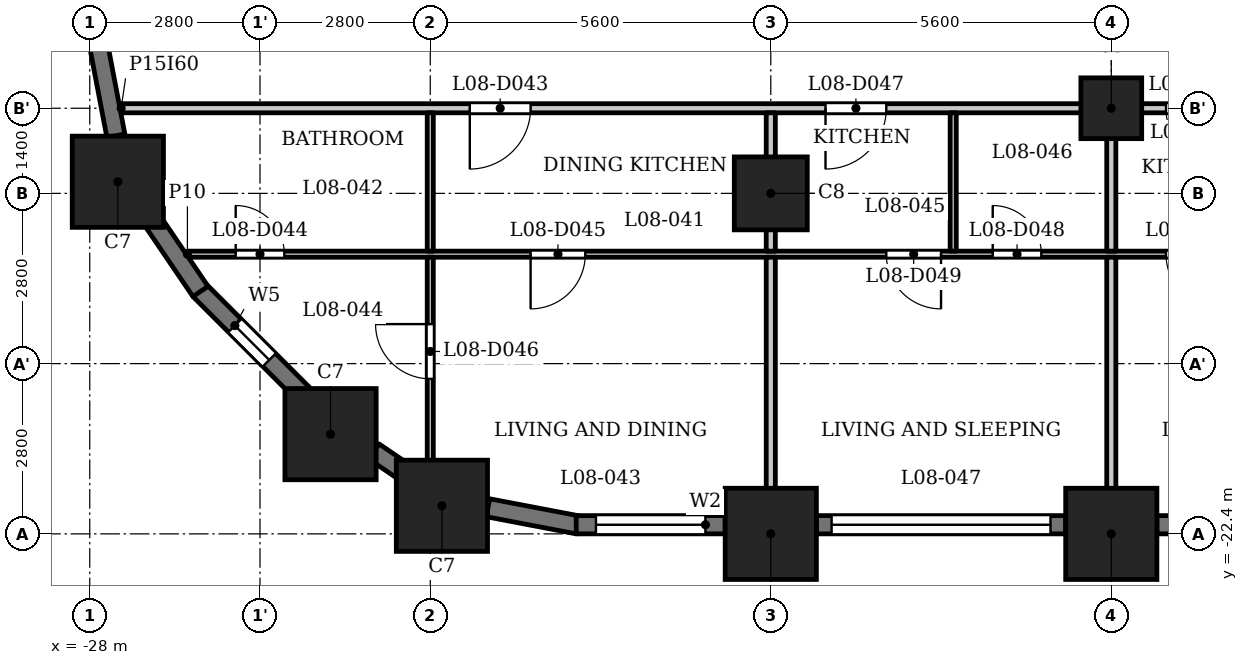
"""IFC4 building model, lengths in metres.
Left out: names, types, materials, properties, quantities, classifications, styles, units other than length and angle.
Written with IfcOpenShell. Run it as: python <this file> out.ifc"""

import sys

from ifc_helpers import new_model, si_unit, direction, frame, frame_2d, origin, origin_2d, place, context, subcontext, project, spatial, rectangle, extrude, element, fill, save


model = new_model("IFC4")
c1 = context("Model", 3, precision=1e-05, world=origin(), true_north=direction((0.0, 1.0)))
c2 = subcontext(c1, "Body", "Model", "MODEL_VIEW")
j1 = project(units=[si_unit("LENGTHUNIT", "METRE"), si_unit("PLANEANGLEUNIT", "RADIAN")], contexts=[c1])
p1 = place(None, origin())
s1 = spatial("IfcSite", under=j1, at=p1, CompositionType="ELEMENT")
p2 = place(p1, origin())
s2 = spatial("IfcBuilding", under=s1, at=p2, CompositionType="ELEMENT")
p3 = place(p2, frame((0.0, 0.0, 37.5)))
s3 = spatial("IfcBuildingStorey", under=s2, at=p3, CompositionType="ELEMENT", Elevation=37.5)
for number, where, z_axis, x_axis in (
    (1, (-22.209, -21.938, 0.0), (0.0, 0.0, 1.0), (1.0, 0.0, 0.0)),
    (2, (-16.8, -22.4, 0.0), (0.0, 0.0, 1.0), (1.0, 0.0, 0.0)),
    (3, (-11.2, -22.4, 0.0), (0.0, 0.0, 1.0), (1.0, 0.0, 0.0)),
    (4, (-27.538, -16.609, 0.0), (0.0, 0.0, 1.0), (1.0, 0.0, 0.0)),
    (5, (-24.04, -20.76, 0.0), (0.0, 0.0, 1.0), (1.0, 0.0, 0.0)),
):
    element("IfcColumn", number, at=place(p3, frame(where, z_axis=z_axis, x_axis=x_axis)), inside=s3, PredefinedType="COLUMN", context=c2, shape_type="SweptSolid", body=[
        extrude(rectangle(XDim=1.5, YDim=1.5, at=origin_2d()), origin(), (0.0, 0.0, 1.0), 3.5),
    ])
p4 = place(p3, frame((-16.8, -16.8, 0.0), z_axis=(0.0, 0.0, 1.0), x_axis=(1.0, 0.0, 0.0)))
e6 = element("IfcColumn", 6, at=p4, inside=s3, PredefinedType="COLUMN", context=c2, shape_type="SweptSolid", body=[
    extrude(rectangle(XDim=1.2, YDim=1.2, at=origin_2d()), origin(), (0.0, 0.0, 1.0), 3.5),
])
p5 = place(p3, frame((-11.2, -15.4, 0.0), z_axis=(0.0, 0.0, 1.0), x_axis=(1.0, 0.0, 0.0)))
e7 = element("IfcColumn", 7, at=p5, inside=s3, PredefinedType="COLUMN", context=c2, shape_type="SweptSolid", body=[
    extrude(rectangle(XDim=1.0, YDim=1.0, at=origin_2d()), origin(), (0.0, 0.0, 1.0), 3.5),
])
p6 = place(p3, frame((-26.197, -18.391, 0.0), z_axis=(0.0, 0.0, 1.0), x_axis=(0.707106781187, -0.707106781187, 0.0)))
e8 = element("IfcWall", 8, at=p6, inside=s3, PredefinedType="SOLIDWALL", context=c2, shape_type="SweptSolid", body=[
    extrude(rectangle(XDim=2.45, YDim=0.3, at=frame_2d((1.225, 0.0))), origin(), (0.0, 0.0, 1.0), 2.35),
])
p7 = place(p6, frame((0.825, 0.0, 0.6)))
e9 = element("IfcOpeningElement", 9, at=p7, cuts=e8, PredefinedType="OPENING", context=c2, shape_type="SweptSolid", body=[
    extrude(rectangle(XDim=0.8, YDim=1.55, at=frame_2d((0.4, 0.775))), frame((0.0, 0.16, 0.0), z_axis=(0.0, -1.0, 0.0), x_axis=(1.0, 0.0, 0.0)), (0.0, 0.0, 1.0), 0.32),
])
p8 = place(p3, frame((-23.327, -21.045, 0.0), z_axis=(0.0, 0.0, 1.0), x_axis=(0.827080706709, -0.562083182981, 0.0)))
e10 = element("IfcWall", 10, at=p8, inside=s3, PredefinedType="SOLIDWALL", context=c2, shape_type="SweptSolid", body=[
    extrude(rectangle(XDim=0.677, YDim=0.3, at=frame_2d((0.339, 0.0))), origin(), (0.0, 0.0, 1.0), 3.2),
])
p9 = place(p3, frame((-21.451, -21.97, 0.0), z_axis=(0.0, 0.0, 1.0), x_axis=(0.982287454367, -0.187380247071, 0.0)))
e11 = element("IfcWall", 11, at=p9, inside=s3, PredefinedType="SOLIDWALL", context=c2, shape_type="SweptSolid", body=[
    extrude(rectangle(XDim=1.506, YDim=0.3, at=frame_2d((0.753, 0.0))), origin(), (0.0, 0.0, 1.0), 2.35),
])
p10 = place(p3, frame((-20.0, -22.25, 0.0), z_axis=(0.0, 0.0, 1.0), x_axis=(1.0, 0.0, 0.0)))
e12 = element("IfcWall", 12, at=p10, inside=s3, PredefinedType="SOLIDWALL", context=c2, shape_type="SweptSolid", body=[
    extrude(rectangle(XDim=2.45, YDim=0.3, at=frame_2d((1.225, 0.0))), origin(), (0.0, 0.0, 1.0), 2.35),
])
p11 = place(p10, frame((0.325, 0.0, 0.9)))
e13 = element("IfcOpeningElement", 13, at=p11, cuts=e12, PredefinedType="OPENING", context=c2, shape_type="SweptSolid", body=[
    extrude(rectangle(XDim=1.8, YDim=1.25, at=frame_2d((0.9, 0.625))), frame((0.0, 0.16, 0.0), z_axis=(0.0, -1.0, 0.0), x_axis=(1.0, 0.0, 0.0)), (0.0, 0.0, 1.0), 0.32),
])
p12 = place(p3, frame((-16.05, -22.25, 0.0), z_axis=(0.0, 0.0, 1.0), x_axis=(1.0, 0.0, 0.0)))
e14 = element("IfcWall", 14, at=p12, inside=s3, PredefinedType="SOLIDWALL", context=c2, shape_type="SweptSolid", body=[
    extrude(rectangle(XDim=4.1, YDim=0.3, at=frame_2d((2.05, 0.0))), origin(), (0.0, 0.0, 1.0), 2.35),
])
p13 = place(p12, frame((0.25, 0.0, 1.2)))
e15 = element("IfcOpeningElement", 15, at=p13, cuts=e14, PredefinedType="OPENING", context=c2, shape_type="SweptSolid", body=[
    extrude(rectangle(XDim=3.6, YDim=0.95, at=frame_2d((1.8, 0.475))), frame((0.0, 0.16, 0.0), z_axis=(0.0, -1.0, 0.0), x_axis=(1.0, 0.0, 0.0)), (0.0, 0.0, 1.0), 0.32),
])
p14 = place(p3, frame((-10.45, -22.25, 0.0), z_axis=(0.0, 0.0, 1.0), x_axis=(1.0, 0.0, 0.0)))
e16 = element("IfcWall", 16, at=p14, inside=s3, PredefinedType="SOLIDWALL", context=c2, shape_type="SweptSolid", body=[
    extrude(rectangle(XDim=4.1, YDim=0.3, at=frame_2d((2.05, 0.0))), origin(), (0.0, 0.0, 1.0), 2.35),
])
p15 = place(p14, frame((0.25, 0.0, 1.2)))
e17 = element("IfcOpeningElement", 17, at=p15, cuts=e16, PredefinedType="OPENING", context=c2, shape_type="SweptSolid", body=[
    extrude(rectangle(XDim=3.6, YDim=0.95, at=frame_2d((1.8, 0.475))), frame((0.0, 0.16, 0.0), z_axis=(0.0, -1.0, 0.0), x_axis=(1.0, 0.0, 0.0)), (0.0, 0.0, 1.0), 0.32),
])
for number, where, z_axis, x_axis in (
    (18, (-27.853, -14.372, 0.0), (0.0, 0.0, 1.0), (0.187, -0.982, 0.0)),
    (19, (-27.025, -17.167, 0.0), (0.0, 0.0, 1.0), (0.562, -0.827, 0.0)),
):
    element("IfcWall", number, at=place(p3, frame(where, z_axis=z_axis, x_axis=x_axis)), inside=s3, PredefinedType="SOLIDWALL", context=c2, shape_type="SweptSolid", body=[
        extrude(rectangle(XDim=1.506, YDim=0.3, at=frame_2d((0.753, 0.0))), origin(), (0.0, 0.0, 1.0), 2.35),
    ])
p16 = place(p3, frame((-26.394, -17.8, 0.0), z_axis=(0.0, 0.0, 1.0), x_axis=(1.0, 0.0, 0.0)))
e20 = element("IfcWall", 20, at=p16, inside=s3, PredefinedType="PARTITIONING", context=c2, shape_type="SweptSolid", body=[
    extrude(rectangle(XDim=53.126, YDim=0.1, at=frame_2d((26.563, 0.0))), origin(), (0.0, 0.0, 1.0), 3.2),
])
p17 = place(p16, frame((0.794, 0.0, 0.0)))
e21 = element("IfcOpeningElement", 21, at=p17, cuts=e20, PredefinedType="OPENING", context=c2, shape_type="SweptSolid", body=[
    extrude(rectangle(XDim=0.8, YDim=2.1, at=frame_2d((0.4, 1.05))), frame((0.0, 0.06, 0.0), z_axis=(0.0, -1.0, 0.0), x_axis=(1.0, 0.0, 0.0)), (0.0, 0.0, 1.0), 0.12),
])
p18 = place(p16, frame((5.644, 0.0, 0.0)))
e22 = element("IfcOpeningElement", 22, at=p18, cuts=e20, PredefinedType="OPENING", context=c2, shape_type="SweptSolid", body=[
    extrude(rectangle(XDim=0.9, YDim=2.1, at=frame_2d((0.45, 1.05))), frame((0.0, 0.06, 0.0), z_axis=(0.0, -1.0, 0.0), x_axis=(1.0, 0.0, 0.0)), (0.0, 0.0, 1.0), 0.12),
])
p19 = place(p16, frame((13.244, 0.0, 0.0)))
e23 = element("IfcOpeningElement", 23, at=p19, cuts=e20, PredefinedType="OPENING", context=c2, shape_type="SweptSolid", body=[
    extrude(rectangle(XDim=0.8, YDim=2.1, at=frame_2d((0.4, 1.05))), frame((0.0, 0.06, 0.0), z_axis=(0.0, -1.0, 0.0), x_axis=(1.0, 0.0, 0.0)), (0.0, 0.0, 1.0), 0.12),
])
p20 = place(p16, frame((11.494, 0.0, 0.0)))
e24 = element("IfcOpeningElement", 24, at=p20, cuts=e20, PredefinedType="OPENING", context=c2, shape_type="SweptSolid", body=[
    extrude(rectangle(XDim=0.9, YDim=2.1, at=frame_2d((0.45, 1.05))), frame((0.0, 0.06, 0.0), z_axis=(0.0, -1.0, 0.0), x_axis=(1.0, 0.0, 0.0)), (0.0, 0.0, 1.0), 0.12),
])
p21 = place(p16, frame((19.344, 0.0, 0.0)))
e25 = element("IfcOpeningElement", 25, at=p21, cuts=e20, PredefinedType="OPENING", context=c2, shape_type="SweptSolid", body=[
    extrude(rectangle(XDim=0.8, YDim=2.1, at=frame_2d((0.4, 1.05))), frame((0.0, 0.06, 0.0), z_axis=(0.0, -1.0, 0.0), x_axis=(1.0, 0.0, 0.0)), (0.0, 0.0, 1.0), 0.12),
])
p22 = place(p16, frame((16.094, 0.0, 0.0)))
e26 = element("IfcOpeningElement", 26, at=p22, cuts=e20, PredefinedType="OPENING", context=c2, shape_type="SweptSolid", body=[
    extrude(rectangle(XDim=0.9, YDim=2.1, at=frame_2d((0.45, 1.05))), frame((0.0, 0.06, 0.0), z_axis=(0.0, -1.0, 0.0), x_axis=(1.0, 0.0, 0.0)), (0.0, 0.0, 1.0), 0.12),
])
p23 = place(p16, frame((24.944, 0.0, 0.0)))
e27 = element("IfcOpeningElement", 27, at=p23, cuts=e20, PredefinedType="OPENING", context=c2, shape_type="SweptSolid", body=[
    extrude(rectangle(XDim=0.8, YDim=2.1, at=frame_2d((0.4, 1.05))), frame((0.0, 0.06, 0.0), z_axis=(0.0, -1.0, 0.0), x_axis=(1.0, 0.0, 0.0)), (0.0, 0.0, 1.0), 0.12),
])
p24 = place(p16, frame((22.444, 0.0, 0.0)))
e28 = element("IfcOpeningElement", 28, at=p24, cuts=e20, PredefinedType="OPENING", context=c2, shape_type="SweptSolid", body=[
    extrude(rectangle(XDim=0.9, YDim=2.1, at=frame_2d((0.45, 1.05))), frame((0.0, 0.06, 0.0), z_axis=(0.0, -1.0, 0.0), x_axis=(1.0, 0.0, 0.0)), (0.0, 0.0, 1.0), 0.12),
])
p25 = place(p16, frame((30.294, 0.0, 0.0)))
e29 = element("IfcOpeningElement", 29, at=p25, cuts=e20, PredefinedType="OPENING", context=c2, shape_type="SweptSolid", body=[
    extrude(rectangle(XDim=0.8, YDim=2.1, at=frame_2d((0.4, 1.05))), frame((0.0, 0.06, 0.0), z_axis=(0.0, -1.0, 0.0), x_axis=(1.0, 0.0, 0.0)), (0.0, 0.0, 1.0), 0.12),
])
p26 = place(p16, frame((26.794, 0.0, 0.0)))
e30 = element("IfcOpeningElement", 30, at=p26, cuts=e20, PredefinedType="OPENING", context=c2, shape_type="SweptSolid", body=[
    extrude(rectangle(XDim=0.9, YDim=2.1, at=frame_2d((0.45, 1.05))), frame((0.0, 0.06, 0.0), z_axis=(0.0, -1.0, 0.0), x_axis=(1.0, 0.0, 0.0)), (0.0, 0.0, 1.0), 0.12),
])
p27 = place(p16, frame((32.744, 0.0, 0.0)))
e31 = element("IfcOpeningElement", 31, at=p27, cuts=e20, PredefinedType="OPENING", context=c2, shape_type="SweptSolid", body=[
    extrude(rectangle(XDim=0.8, YDim=2.1, at=frame_2d((0.4, 1.05))), frame((0.0, 0.06, 0.0), z_axis=(0.0, -1.0, 0.0), x_axis=(1.0, 0.0, 0.0)), (0.0, 0.0, 1.0), 0.12),
])
p28 = place(p16, frame((35.594, 0.0, 0.0)))
e32 = element("IfcOpeningElement", 32, at=p28, cuts=e20, PredefinedType="OPENING", context=c2, shape_type="SweptSolid", body=[
    extrude(rectangle(XDim=0.9, YDim=2.1, at=frame_2d((0.45, 1.05))), frame((0.0, 0.06, 0.0), z_axis=(0.0, -1.0, 0.0), x_axis=(1.0, 0.0, 0.0)), (0.0, 0.0, 1.0), 0.12),
])
p29 = place(p16, frame((39.244, 0.0, 0.0)))
e33 = element("IfcOpeningElement", 33, at=p29, cuts=e20, PredefinedType="OPENING", context=c2, shape_type="SweptSolid", body=[
    extrude(rectangle(XDim=0.9, YDim=2.1, at=frame_2d((0.45, 1.05))), frame((0.0, 0.06, 0.0), z_axis=(0.0, -1.0, 0.0), x_axis=(1.0, 0.0, 0.0)), (0.0, 0.0, 1.0), 0.12),
])
p30 = place(p16, frame((41.544, 0.0, 0.0)))
e34 = element("IfcOpeningElement", 34, at=p30, cuts=e20, PredefinedType="OPENING", context=c2, shape_type="SweptSolid", body=[
    extrude(rectangle(XDim=0.9, YDim=2.1, at=frame_2d((0.45, 1.05))), frame((0.0, 0.06, 0.0), z_axis=(0.0, -1.0, 0.0), x_axis=(1.0, 0.0, 0.0)), (0.0, 0.0, 1.0), 0.12),
])
p31 = place(p16, frame((49.362, 0.0, 0.0)))
e35 = element("IfcOpeningElement", 35, at=p31, cuts=e20, PredefinedType="OPENING", context=c2, shape_type="SweptSolid", body=[
    extrude(rectangle(XDim=0.8, YDim=2.1, at=frame_2d((0.4, 1.05))), frame((0.0, 0.06, 0.0), z_axis=(0.0, -1.0, 0.0), x_axis=(1.0, 0.0, 0.0)), (0.0, 0.0, 1.0), 0.12),
])
p32 = place(p16, frame((45.094, 0.0, 0.0)))
e36 = element("IfcOpeningElement", 36, at=p32, cuts=e20, PredefinedType="OPENING", context=c2, shape_type="SweptSolid", body=[
    extrude(rectangle(XDim=0.9, YDim=2.1, at=frame_2d((0.45, 1.05))), frame((0.0, 0.06, 0.0), z_axis=(0.0, -1.0, 0.0), x_axis=(1.0, 0.0, 0.0)), (0.0, 0.0, 1.0), 0.12),
])
p33 = place(p3, frame((-27.484, -15.4, 0.0), z_axis=(0.0, 0.0, 1.0), x_axis=(1.0, 0.0, 0.0)))
e37 = element("IfcWall", 37, at=p33, inside=s3, PredefinedType="PARTITIONING", context=c2, shape_type="SweptSolid", body=[
    extrude(rectangle(XDim=54.968, YDim=0.15, at=frame_2d((27.484, 0.0))), origin(), (0.0, 0.0, 1.0), 3.2),
])
p34 = place(p33, frame((5.734, 0.0, 0.0)))
e38 = element("IfcOpeningElement", 38, at=p34, cuts=e37, PredefinedType="OPENING", context=c2, shape_type="SweptSolid", body=[
    extrude(rectangle(XDim=1.0, YDim=2.1, at=frame_2d((0.5, 1.05))), frame((0.0, 0.085, 0.0), z_axis=(0.0, -1.0, 0.0), x_axis=(1.0, 0.0, 0.0)), (0.0, 0.0, 1.0), 0.17),
])
p35 = place(p33, frame((11.584, 0.0, 0.0)))
e39 = element("IfcOpeningElement", 39, at=p35, cuts=e37, PredefinedType="OPENING", context=c2, shape_type="SweptSolid", body=[
    extrude(rectangle(XDim=1.0, YDim=2.1, at=frame_2d((0.5, 1.05))), frame((0.0, 0.085, 0.0), z_axis=(0.0, -1.0, 0.0), x_axis=(1.0, 0.0, 0.0)), (0.0, 0.0, 1.0), 0.17),
])
p36 = place(p33, frame((17.184, 0.0, 0.0)))
e40 = element("IfcOpeningElement", 40, at=p36, cuts=e37, PredefinedType="OPENING", context=c2, shape_type="SweptSolid", body=[
    extrude(rectangle(XDim=1.0, YDim=2.1, at=frame_2d((0.5, 1.05))), frame((0.0, 0.085, 0.0), z_axis=(0.0, -1.0, 0.0), x_axis=(1.0, 0.0, 0.0)), (0.0, 0.0, 1.0), 0.17),
])
p37 = place(p33, frame((22.534, 0.0, 0.0)))
e41 = element("IfcOpeningElement", 41, at=p37, cuts=e37, PredefinedType="OPENING", context=c2, shape_type="SweptSolid", body=[
    extrude(rectangle(XDim=1.0, YDim=2.1, at=frame_2d((0.5, 1.05))), frame((0.0, 0.085, 0.0), z_axis=(0.0, -1.0, 0.0), x_axis=(1.0, 0.0, 0.0)), (0.0, 0.0, 1.0), 0.17),
])
p38 = place(p33, frame((28.884, 0.0, 0.0)))
e42 = element("IfcOpeningElement", 42, at=p38, cuts=e37, PredefinedType="OPENING", context=c2, shape_type="SweptSolid", body=[
    extrude(rectangle(XDim=1.0, YDim=2.1, at=frame_2d((0.5, 1.05))), frame((0.0, 0.085, 0.0), z_axis=(0.0, -1.0, 0.0), x_axis=(1.0, 0.0, 0.0)), (0.0, 0.0, 1.0), 0.17),
])
p39 = place(p33, frame((39.334, 0.0, 0.0)))
e43 = element("IfcOpeningElement", 43, at=p39, cuts=e37, PredefinedType="OPENING", context=c2, shape_type="SweptSolid", body=[
    extrude(rectangle(XDim=1.0, YDim=2.1, at=frame_2d((0.5, 1.05))), frame((0.0, 0.085, 0.0), z_axis=(0.0, -1.0, 0.0), x_axis=(1.0, 0.0, 0.0)), (0.0, 0.0, 1.0), 0.17),
])
p40 = place(p33, frame((45.184, 0.0, 0.0)))
e44 = element("IfcOpeningElement", 44, at=p40, cuts=e37, PredefinedType="OPENING", context=c2, shape_type="SweptSolid", body=[
    extrude(rectangle(XDim=1.0, YDim=2.1, at=frame_2d((0.5, 1.05))), frame((0.0, 0.085, 0.0), z_axis=(0.0, -1.0, 0.0), x_axis=(1.0, 0.0, 0.0)), (0.0, 0.0, 1.0), 0.17),
])
p41 = place(p3, frame((-22.4, -21.72, 0.0), z_axis=(0.0, 0.0, 1.0), x_axis=(0.0, 1.0, 0.0)))
e45 = element("IfcWall", 45, at=p41, inside=s3, PredefinedType="PARTITIONING", context=c2, shape_type="SweptSolid", body=[
    extrude(rectangle(XDim=3.87, YDim=0.1, at=frame_2d((1.935, 0.0))), origin(), (0.0, 0.0, 1.0), 3.2),
])
p42 = place(p41, frame((1.87, 0.0, 0.0)))
e46 = element("IfcOpeningElement", 46, at=p42, cuts=e45, PredefinedType="OPENING", context=c2, shape_type="SweptSolid", body=[
    extrude(rectangle(XDim=0.9, YDim=2.1, at=frame_2d((0.45, 1.05))), frame((0.0, 0.06, 0.0), z_axis=(0.0, -1.0, 0.0), x_axis=(1.0, 0.0, 0.0)), (0.0, 0.0, 1.0), 0.12),
])
p43 = place(p3, frame((-22.4, -17.75, 0.0), z_axis=(0.0, 0.0, 1.0), x_axis=(0.0, 1.0, 0.0)))
e47 = element("IfcWall", 47, at=p43, inside=s3, PredefinedType="PARTITIONING", context=c2, shape_type="SweptSolid", body=[
    extrude(rectangle(XDim=2.275, YDim=0.1, at=frame_2d((1.137, 0.0))), origin(), (0.0, 0.0, 1.0), 3.2),
])
p44 = place(p3, frame((-16.8, -23.13, 0.0), z_axis=(0.0, 0.0, 1.0), x_axis=(0.0, 1.0, 0.0)))
e48 = element("IfcWall", 48, at=p44, inside=s3, PredefinedType="PARTITIONING", context=c2, shape_type="SweptSolid", body=[
    extrude(rectangle(XDim=5.28, YDim=0.15, at=frame_2d((2.64, 0.0))), origin(), (0.0, 0.0, 1.0), 3.2),
])
p45 = place(p3, frame((-16.8, -17.75, 0.0), z_axis=(0.0, 0.0, 1.0), x_axis=(0.0, 1.0, 0.0)))
e49 = element("IfcWall", 49, at=p45, inside=s3, PredefinedType="PARTITIONING", context=c2, shape_type="SweptSolid", body=[
    extrude(rectangle(XDim=2.275, YDim=0.15, at=frame_2d((1.137, 0.0))), origin(), (0.0, 0.0, 1.0), 3.2),
])
p46 = place(p3, frame((-13.8, -17.75, 0.0), z_axis=(0.0, 0.0, 1.0), x_axis=(0.0, 1.0, 0.0)))
e50 = element("IfcWall", 50, at=p46, inside=s3, PredefinedType="PARTITIONING", context=c2, shape_type="SweptSolid", body=[
    extrude(rectangle(XDim=2.275, YDim=0.1, at=frame_2d((1.137, 0.0))), origin(), (0.0, 0.0, 1.0), 3.2),
])
p47 = place(p3, frame((-11.2, -23.13, 0.0), z_axis=(0.0, 0.0, 1.0), x_axis=(0.0, 1.0, 0.0)))
e51 = element("IfcWall", 51, at=p47, inside=s3, PredefinedType="PARTITIONING", context=c2, shape_type="SweptSolid", body=[
    extrude(rectangle(XDim=5.28, YDim=0.15, at=frame_2d((2.64, 0.0))), origin(), (0.0, 0.0, 1.0), 3.2),
])
p48 = place(p3, frame((-11.2, -17.75, 0.0), z_axis=(0.0, 0.0, 1.0), x_axis=(0.0, 1.0, 0.0)))
e52 = element("IfcWall", 52, at=p48, inside=s3, PredefinedType="PARTITIONING", context=c2, shape_type="SweptSolid", body=[
    extrude(rectangle(XDim=2.275, YDim=0.15, at=frame_2d((1.137, 0.0))), origin(), (0.0, 0.0, 1.0), 3.2),
])
p49 = place(p34, origin())
e53 = element("IfcDoor", 53, at=p49, inside=s3, OperationType="SINGLE_SWING_LEFT", PredefinedType="DOOR", context=c2, shape_type="SweptSolid", body=[
    extrude(rectangle(XDim=1.0, YDim=2.1, at=frame_2d((0.5, 1.05))), frame((0.0, 0.025, 0.0), z_axis=(0.0, -1.0, 0.0), x_axis=(1.0, 0.0, 0.0)), (0.0, 0.0, 1.0), 0.05),
])
fill(e38, e53)
p50 = place(p17, origin())
e54 = element("IfcDoor", 54, at=p50, inside=s3, OperationType="SINGLE_SWING_RIGHT", PredefinedType="DOOR", context=c2, shape_type="SweptSolid", body=[
    extrude(rectangle(XDim=0.8, YDim=2.1, at=frame_2d((0.4, 1.05))), frame((0.0, 0.025, 0.0), z_axis=(0.0, -1.0, 0.0), x_axis=(1.0, 0.0, 0.0)), (0.0, 0.0, 1.0), 0.05),
])
fill(e21, e54)
p51 = place(p18, origin())
e55 = element("IfcDoor", 55, at=p51, inside=s3, OperationType="SINGLE_SWING_LEFT", PredefinedType="DOOR", context=c2, shape_type="SweptSolid", body=[
    extrude(rectangle(XDim=0.9, YDim=2.1, at=frame_2d((0.45, 1.05))), frame((0.0, 0.025, 0.0), z_axis=(0.0, -1.0, 0.0), x_axis=(1.0, 0.0, 0.0)), (0.0, 0.0, 1.0), 0.05),
])
fill(e22, e55)
p52 = place(p42, origin())
e56 = element("IfcDoor", 56, at=p52, inside=s3, OperationType="SINGLE_SWING_LEFT", PredefinedType="DOOR", context=c2, shape_type="SweptSolid", body=[
    extrude(rectangle(XDim=0.9, YDim=2.1, at=frame_2d((0.45, 1.05))), frame((0.0, 0.025, 0.0), z_axis=(0.0, -1.0, 0.0), x_axis=(1.0, 0.0, 0.0)), (0.0, 0.0, 1.0), 0.05),
])
fill(e46, e56)
p53 = place(p35, origin())
e57 = element("IfcDoor", 57, at=p53, inside=s3, OperationType="SINGLE_SWING_LEFT", PredefinedType="DOOR", context=c2, shape_type="SweptSolid", body=[
    extrude(rectangle(XDim=1.0, YDim=2.1, at=frame_2d((0.5, 1.05))), frame((0.0, 0.025, 0.0), z_axis=(0.0, -1.0, 0.0), x_axis=(1.0, 0.0, 0.0)), (0.0, 0.0, 1.0), 0.05),
])
fill(e39, e57)
p54 = place(p19, origin())
e58 = element("IfcDoor", 58, at=p54, inside=s3, OperationType="SINGLE_SWING_RIGHT", PredefinedType="DOOR", context=c2, shape_type="SweptSolid", body=[
    extrude(rectangle(XDim=0.8, YDim=2.1, at=frame_2d((0.4, 1.05))), frame((0.0, 0.025, 0.0), z_axis=(0.0, -1.0, 0.0), x_axis=(1.0, 0.0, 0.0)), (0.0, 0.0, 1.0), 0.05),
])
fill(e23, e58)
p55 = place(p20, origin())
e59 = element("IfcDoor", 59, at=p55, inside=s3, OperationType="SINGLE_SWING_RIGHT", PredefinedType="DOOR", context=c2, shape_type="SweptSolid", body=[
    extrude(rectangle(XDim=0.9, YDim=2.1, at=frame_2d((0.45, 1.05))), frame((0.0, 0.025, 0.0), z_axis=(0.0, -1.0, 0.0), x_axis=(1.0, 0.0, 0.0)), (0.0, 0.0, 1.0), 0.05),
])
fill(e24, e59)
p56 = place(p36, origin())
e60 = element("IfcDoor", 60, at=p56, inside=s3, OperationType="SINGLE_SWING_RIGHT", PredefinedType="DOOR", context=c2, shape_type="SweptSolid", body=[
    extrude(rectangle(XDim=1.0, YDim=2.1, at=frame_2d((0.5, 1.05))), frame((0.0, 0.025, 0.0), z_axis=(0.0, -1.0, 0.0), x_axis=(1.0, 0.0, 0.0)), (0.0, 0.0, 1.0), 0.05),
])
fill(e40, e60)
p57 = place(p22, origin())
e61 = element("IfcDoor", 61, at=p57, inside=s3, OperationType="SINGLE_SWING_RIGHT", PredefinedType="DOOR", context=c2, shape_type="SweptSolid", body=[
    extrude(rectangle(XDim=0.9, YDim=2.1, at=frame_2d((0.45, 1.05))), frame((0.0, 0.025, 0.0), z_axis=(0.0, -1.0, 0.0), x_axis=(1.0, 0.0, 0.0)), (0.0, 0.0, 1.0), 0.05),
])
fill(e26, e61)
p58 = place(p7, origin())
e62 = element("IfcWindow", 62, at=p58, inside=s3, PartitioningType="SINGLE_PANEL", PredefinedType="WINDOW", context=c2, shape_type="SweptSolid", body=[
    extrude(rectangle(XDim=0.8, YDim=1.55, at=frame_2d((0.4, 0.775))), frame((0.0, 0.03, 0.0), z_axis=(0.0, -1.0, 0.0), x_axis=(1.0, 0.0, 0.0)), (0.0, 0.0, 1.0), 0.06),
])
fill(e9, e62)
p59 = place(p11, origin())
e63 = element("IfcWindow", 63, at=p59, inside=s3, PartitioningType="SINGLE_PANEL", PredefinedType="WINDOW", context=c2, shape_type="SweptSolid", body=[
    extrude(rectangle(XDim=1.8, YDim=1.25, at=frame_2d((0.9, 0.625))), frame((0.0, 0.03, 0.0), z_axis=(0.0, -1.0, 0.0), x_axis=(1.0, 0.0, 0.0)), (0.0, 0.0, 1.0), 0.06),
])
fill(e13, e63)
p60 = place(p13, origin())
e64 = element("IfcWindow", 64, at=p60, inside=s3, PartitioningType="SINGLE_PANEL", PredefinedType="WINDOW", context=c2, shape_type="SweptSolid", body=[
    extrude(rectangle(XDim=3.6, YDim=0.95, at=frame_2d((1.8, 0.475))), frame((0.0, 0.03, 0.0), z_axis=(0.0, -1.0, 0.0), x_axis=(1.0, 0.0, 0.0)), (0.0, 0.0, 1.0), 0.06),
])
fill(e15, e64)
save(model, sys.argv[1])
